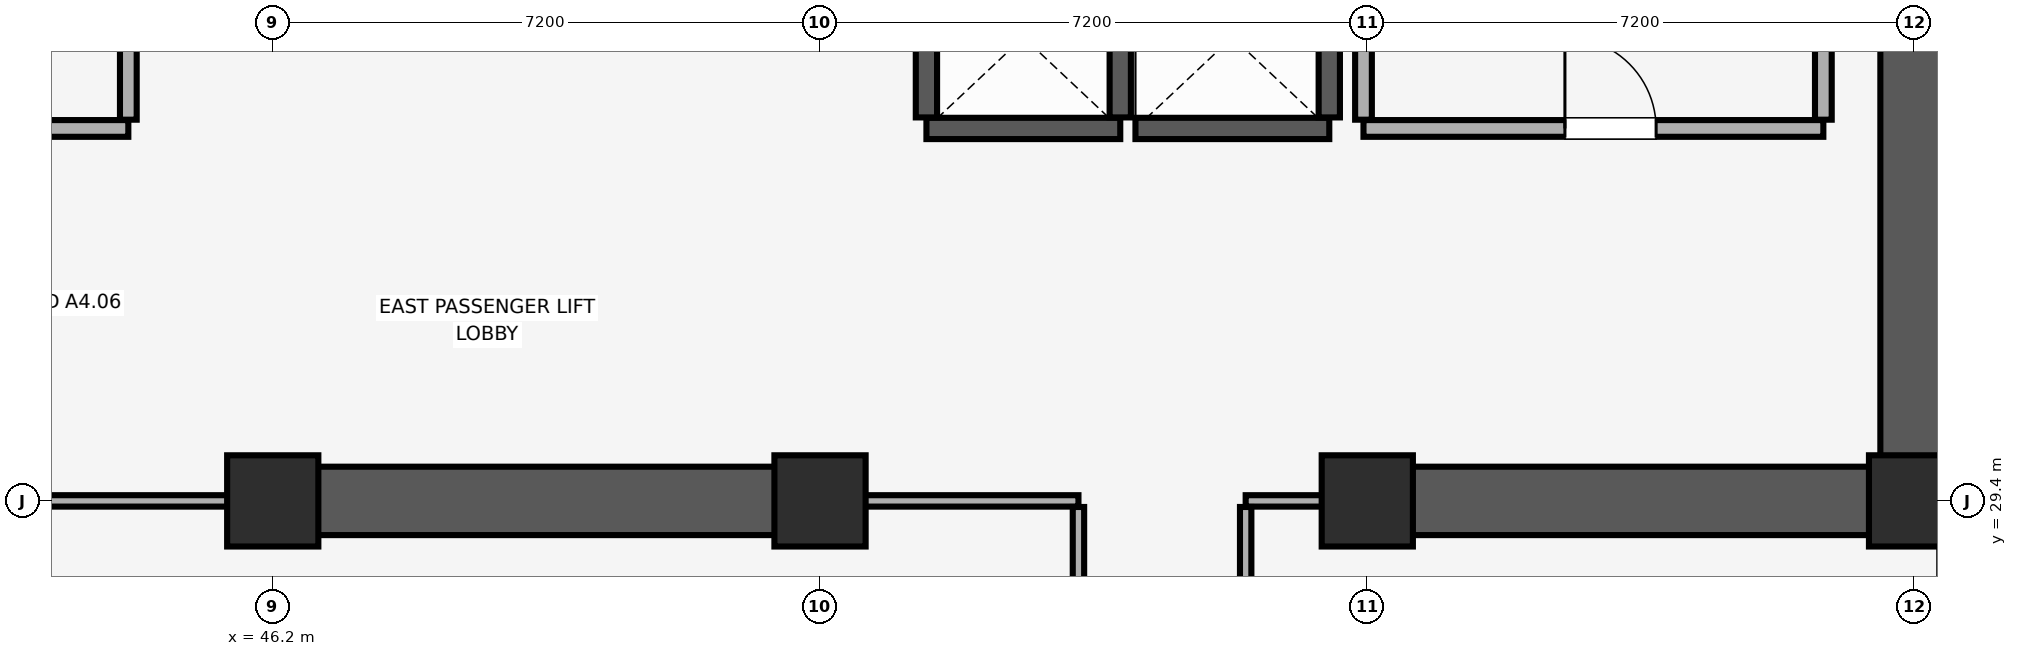
"""IFC4 building model, lengths in metres.
Left out: names, types, materials, properties, quantities, classifications, styles, units other than length and angle.
Written with IfcOpenShell. Run it as: python <this file> out.ifc"""

import sys

from ifc_helpers import new_model, si_unit, direction, frame, frame_2d, origin, origin_2d, place, context, subcontext, project, spatial, rectangle, extrude, element, fill, save


model = new_model("IFC4")
c1 = context("Model", 3, precision=1e-05, world=origin(), true_north=direction((0.0, 1.0)))
c2 = subcontext(c1, "Body", "Model", "MODEL_VIEW")
j1 = project(units=[si_unit("LENGTHUNIT", "METRE"), si_unit("PLANEANGLEUNIT", "RADIAN")], contexts=[c1])
p1 = place(None, origin())
s1 = spatial("IfcSite", under=j1, at=p1, CompositionType="ELEMENT")
p2 = place(p1, origin())
s2 = spatial("IfcBuilding", under=s1, at=p2, CompositionType="ELEMENT")
p3 = place(p2, frame((0.0, 0.0, 93.05)))
s3 = spatial("IfcBuildingStorey", under=s2, at=p3, CompositionType="ELEMENT", Elevation=93.05)
for number, where, z_axis, x_axis in (
    (1, (46.2, 29.4, 0.0), (0.0, 0.0, 1.0), (1.0, 0.0, 0.0)),
    (2, (53.4, 29.4, 0.0), (0.0, 0.0, 1.0), (1.0, 0.0, 0.0)),
    (3, (60.6, 29.4, 0.0), (0.0, 0.0, 1.0), (1.0, 0.0, 0.0)),
    (4, (67.8, 29.4, 0.0), (0.0, 0.0, 1.0), (1.0, 0.0, 0.0)),
):
    element("IfcColumn", number, at=place(p3, frame(where, z_axis=z_axis, x_axis=x_axis)), inside=s3, PredefinedType="COLUMN", context=c2, shape_type="SweptSolid", body=[
        extrude(rectangle(XDim=1.2, YDim=1.2, at=origin_2d()), origin(), (0.0, 0.0, 1.0), 3.51),
    ])
p4 = place(p3, frame((67.8, 29.4, 0.0), z_axis=(0.0, 0.0, 1.0), x_axis=(0.0, 1.0, 0.0)))
e5 = element("IfcWall", 5, at=p4, inside=s3, PredefinedType="SHEAR", context=c2, shape_type="SweptSolid", body=[
    extrude(rectangle(XDim=19.2, YDim=0.9, at=frame_2d((9.6, 0.0))), origin(), (0.0, 0.0, 1.0), 3.51),
])
p5 = place(p3, frame((46.0, 29.4, 0.0), z_axis=(0.0, 0.0, 1.0), x_axis=(1.0, 0.0, 0.0)))
e6 = element("IfcWall", 6, at=p5, inside=s3, PredefinedType="SHEAR", context=c2, shape_type="SweptSolid", body=[
    extrude(rectangle(XDim=7.6, YDim=0.9, at=frame_2d((3.8, 0.0))), origin(), (0.0, 0.0, 1.0), 3.51),
])
p6 = place(p3, frame((60.4, 29.4, 0.0), z_axis=(0.0, 0.0, 1.0), x_axis=(1.0, 0.0, 0.0)))
e7 = element("IfcWall", 7, at=p6, inside=s3, PredefinedType="SHEAR", context=c2, shape_type="SweptSolid", body=[
    extrude(rectangle(XDim=6.945, YDim=0.9, at=frame_2d((3.473, 0.0))), origin(), (0.0, 0.0, 1.0), 3.51),
])
p7 = place(p3, frame((54.8, 34.3, 0.0), z_axis=(0.0, 0.0, 1.0), x_axis=(1.0, 0.0, 0.0)))
e8 = element("IfcWall", 8, at=p7, inside=s3, PredefinedType="SHEAR", context=c2, shape_type="SweptSolid", body=[
    extrude(rectangle(XDim=2.55, YDim=0.28, at=frame_2d((1.275, 0.0))), origin(), (0.0, 0.0, 1.0), 3.51),
])
for number, where, z_axis, x_axis in (
    (9, (54.8, 34.445, 0.0), (0.0, 0.0, 1.0), (0.0, 1.0, 0.0)),
    (10, (57.35, 34.445, 0.0), (0.0, 0.0, 1.0), (0.0, 1.0, 0.0)),
):
    element("IfcWall", number, at=place(p3, frame(where, z_axis=z_axis, x_axis=x_axis)), inside=s3, PredefinedType="SHEAR", context=c2, shape_type="SweptSolid", body=[
        extrude(rectangle(XDim=2.11, YDim=0.28, at=frame_2d((1.055, 0.0))), origin(), (0.0, 0.0, 1.0), 3.51),
    ])
p8 = place(p3, frame((57.55, 34.3, 0.0), z_axis=(0.0, 0.0, 1.0), x_axis=(1.0, 0.0, 0.0)))
e11 = element("IfcWall", 11, at=p8, inside=s3, PredefinedType="SHEAR", context=c2, shape_type="SweptSolid", body=[
    extrude(rectangle(XDim=2.55, YDim=0.28, at=frame_2d((1.275, 0.0))), origin(), (0.0, 0.0, 1.0), 3.51),
])
p9 = place(p3, frame((60.1, 34.445, 0.0), z_axis=(0.0, 0.0, 1.0), x_axis=(0.0, 1.0, 0.0)))
e12 = element("IfcWall", 12, at=p9, inside=s3, PredefinedType="SHEAR", context=c2, shape_type="SweptSolid", body=[
    extrude(rectangle(XDim=2.11, YDim=0.28, at=frame_2d((1.055, 0.0))), origin(), (0.0, 0.0, 1.0), 3.51),
])
p10 = place(p3, frame((60.55, 34.3, 0.0), z_axis=(0.0, 0.0, 1.0), x_axis=(1.0, 0.0, 0.0)))
e13 = element("IfcWall", 13, at=p10, inside=s3, PredefinedType="PARTITIONING", context=c2, shape_type="SweptSolid", body=[
    extrude(rectangle(XDim=6.05, YDim=0.22, at=frame_2d((3.025, 0.0))), origin(), (0.0, 0.0, 1.0), 3.51),
])
p11 = place(p10, frame((2.65, 0.0, 0.0)))
e14 = element("IfcOpeningElement", 14, at=p11, cuts=e13, PredefinedType="OPENING", context=c2, shape_type="SweptSolid", body=[
    extrude(rectangle(XDim=1.2, YDim=2.15, at=frame_2d((0.6, 1.075))), frame((0.0, 0.12, 0.0), z_axis=(0.0, -1.0, 0.0), x_axis=(1.0, 0.0, 0.0)), (0.0, 0.0, 1.0), 0.24),
])
p12 = place(p3, frame((60.55, 34.415, 0.0), z_axis=(0.0, 0.0, 1.0), x_axis=(0.0, 1.0, 0.0)))
e15 = element("IfcWall", 15, at=p12, inside=s3, PredefinedType="PARTITIONING", context=c2, shape_type="SweptSolid", body=[
    extrude(rectangle(XDim=5.64, YDim=0.22, at=frame_2d((2.82, 0.0))), origin(), (0.0, 0.0, 1.0), 3.51),
])
p13 = place(p3, frame((66.6, 34.415, 0.0), z_axis=(0.0, 0.0, 1.0), x_axis=(0.0, 1.0, 0.0)))
e16 = element("IfcWall", 16, at=p13, inside=s3, PredefinedType="PARTITIONING", context=c2, shape_type="SweptSolid", body=[
    extrude(rectangle(XDim=5.43, YDim=0.22, at=frame_2d((2.715, 0.0))), origin(), (0.0, 0.0, 1.0), 3.51),
])
p14 = place(p3, frame((39.7, 34.3, 0.0), z_axis=(0.0, 0.0, 1.0), x_axis=(1.0, 0.0, 0.0)))
e17 = element("IfcWall", 17, at=p14, inside=s3, PredefinedType="PARTITIONING", context=c2, shape_type="SweptSolid", body=[
    extrude(rectangle(XDim=4.6, YDim=0.22, at=frame_2d((2.3, 0.0))), origin(), (0.0, 0.0, 1.0), 3.51),
])
p15 = place(p14, frame((1.7, 0.0, 0.0)))
e18 = element("IfcOpeningElement", 18, at=p15, cuts=e17, PredefinedType="OPENING", context=c2, shape_type="SweptSolid", body=[
    extrude(rectangle(XDim=1.2, YDim=2.15, at=frame_2d((0.6, 1.075))), frame((0.0, 0.12, 0.0), z_axis=(0.0, -1.0, 0.0), x_axis=(1.0, 0.0, 0.0)), (0.0, 0.0, 1.0), 0.24),
])
p16 = place(p3, frame((44.3, 34.415, 0.0), z_axis=(0.0, 0.0, 1.0), x_axis=(0.0, 1.0, 0.0)))
e19 = element("IfcWall", 19, at=p16, inside=s3, PredefinedType="PARTITIONING", context=c2, shape_type="SweptSolid", body=[
    extrude(rectangle(XDim=5.785, YDim=0.22, at=frame_2d((2.893, 0.0))), origin(), (0.0, 0.0, 1.0), 3.51),
])
p17 = place(p3, frame((41.18, 29.4, 0.0), z_axis=(0.0, 0.0, 1.0), x_axis=(1.0, 0.0, 0.0)))
e20 = element("IfcWall", 20, at=p17, inside=s3, PredefinedType="PARTITIONING", context=c2, shape_type="SweptSolid", body=[
    extrude(rectangle(XDim=4.81, YDim=0.15, at=frame_2d((2.405, 0.0))), origin(), (0.0, 0.0, 1.0), 2.41),
])
p18 = place(p3, frame((53.61, 29.4, 0.0), z_axis=(0.0, 0.0, 1.0), x_axis=(1.0, 0.0, 0.0)))
e21 = element("IfcWall", 21, at=p18, inside=s3, PredefinedType="PARTITIONING", context=c2, shape_type="SweptSolid", body=[
    extrude(rectangle(XDim=3.19, YDim=0.15, at=frame_2d((1.595, 0.0))), origin(), (0.0, 0.0, 1.0), 2.41),
])
p19 = place(p3, frame((56.8, 22.53, 0.0), z_axis=(0.0, 0.0, 1.0), x_axis=(0.0, 1.0, 0.0)))
e22 = element("IfcWall", 22, at=p19, inside=s3, PredefinedType="PARTITIONING", context=c2, shape_type="SweptSolid", body=[
    extrude(rectangle(XDim=6.79, YDim=0.15, at=frame_2d((3.395, 0.0))), origin(), (0.0, 0.0, 1.0), 2.977),
])
p20 = place(p3, frame((59.0, 29.4, 0.0), z_axis=(0.0, 0.0, 1.0), x_axis=(1.0, 0.0, 0.0)))
e23 = element("IfcWall", 23, at=p20, inside=s3, PredefinedType="PARTITIONING", context=c2, shape_type="SweptSolid", body=[
    extrude(rectangle(XDim=1.39, YDim=0.15, at=frame_2d((0.695, 0.0))), origin(), (0.0, 0.0, 1.0), 2.41),
])
p21 = place(p3, frame((59.0, 22.53, 0.0), z_axis=(0.0, 0.0, 1.0), x_axis=(0.0, 1.0, 0.0)))
e24 = element("IfcWall", 24, at=p21, inside=s3, PredefinedType="PARTITIONING", context=c2, shape_type="SweptSolid", body=[
    extrude(rectangle(XDim=6.79, YDim=0.15, at=frame_2d((3.395, 0.0))), origin(), (0.0, 0.0, 1.0), 3.51),
])
p22 = place(p11, origin())
e25 = element("IfcDoor", 25, at=p22, inside=s3, OperationType="SINGLE_SWING_LEFT", PredefinedType="DOOR", context=c2, shape_type="SweptSolid", body=[
    extrude(rectangle(XDim=1.2, YDim=2.15, at=frame_2d((0.6, 1.075))), frame((0.0, 0.025, 0.0), z_axis=(0.0, -1.0, 0.0), x_axis=(1.0, 0.0, 0.0)), (0.0, 0.0, 1.0), 0.05),
])
fill(e14, e25)
save(model, sys.argv[1])
